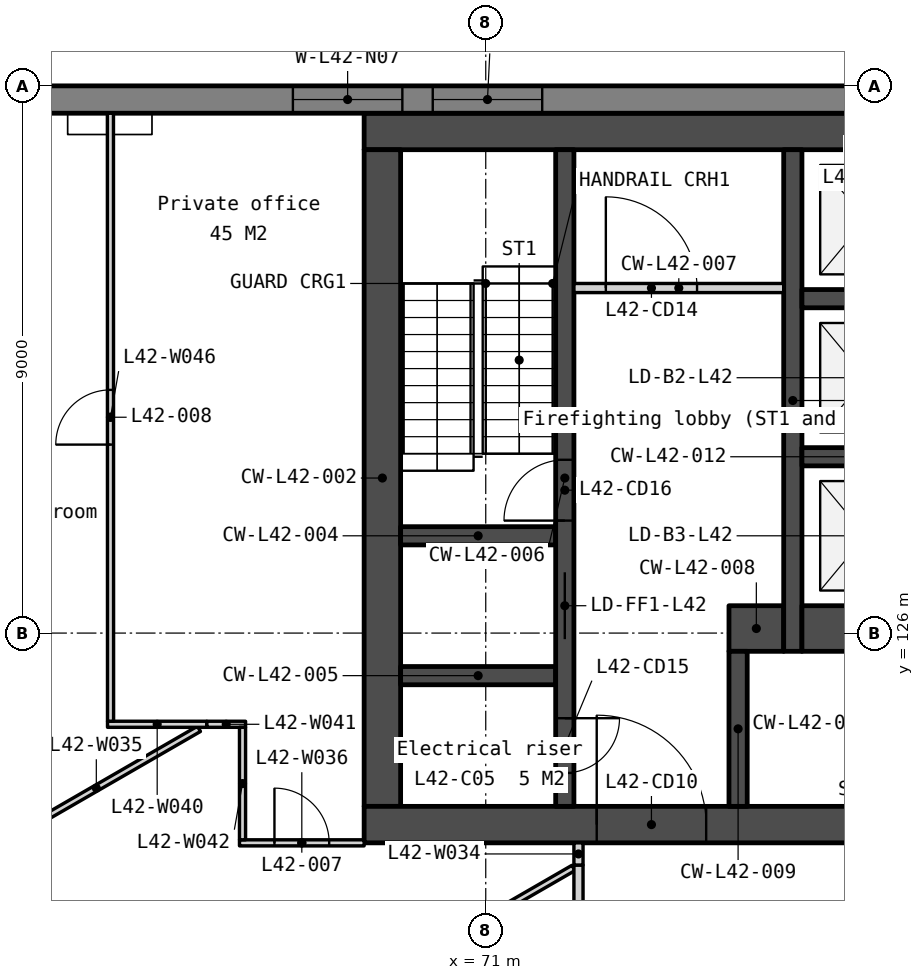
"""IFC4 building model, lengths in metres.
Left out: names, types, materials, properties, quantities, classifications, styles, units other than length and angle.
Written with IfcOpenShell. Run it as: python <this file> out.ifc"""

import sys

from ifc_helpers import new_model, si_unit, direction, frame, frame_2d, origin, place, context, subcontext, project, spatial, polyline, rectangle, outline, extrude, element, fill, save


model = new_model("IFC4")
c1 = context("Model", 3, precision=1e-05, world=origin(), true_north=direction((0.0, 1.0)))
c2 = subcontext(c1, "Body", "Model", "MODEL_VIEW")
j1 = project(units=[si_unit("LENGTHUNIT", "METRE"), si_unit("PLANEANGLEUNIT", "RADIAN")], contexts=[c1])
p1 = place(None, origin())
s1 = spatial("IfcSite", under=j1, at=p1, CompositionType="ELEMENT")
p2 = place(p1, origin())
s2 = spatial("IfcBuilding", under=s1, at=p2, CompositionType="ELEMENT")
p3 = place(p2, frame((0.0, 0.0, 167.6)))
s3 = spatial("IfcBuildingStorey", under=s2, at=p3, CompositionType="ELEMENT", Elevation=167.6)
p4 = place(p3, frame((69.0, 134.25, 0.0), z_axis=(0.0, 0.0, 1.0), x_axis=(1.0, 0.0, 0.0)))
e1 = element("IfcWall", 1, at=p4, inside=s3, PredefinedType="SOLIDWALL", context=c2, shape_type="SweptSolid", body=[
    extrude(rectangle(XDim=22.0, YDim=0.6, at=frame_2d((11.0, 0.0))), origin(), (0.0, 0.0, 1.0), 3.75),
])
p5 = place(p3, frame((69.3, 133.95, 0.0), z_axis=(0.0, 0.0, 1.0), x_axis=(0.0, -1.0, 0.0)))
e2 = element("IfcWall", 2, at=p5, inside=s3, PredefinedType="SOLIDWALL", context=c2, shape_type="SweptSolid", body=[
    extrude(rectangle(XDim=10.8, YDim=0.6, at=frame_2d((5.4, 0.0))), origin(), (0.0, 0.0, 1.0), 3.75),
])
p6 = place(p3, frame((69.0, 122.85, 0.0), z_axis=(0.0, 0.0, 1.0), x_axis=(1.0, 0.0, 0.0)))
e3 = element("IfcWall", 3, at=p6, inside=s3, PredefinedType="SOLIDWALL", context=c2, shape_type="SweptSolid", body=[
    extrude(rectangle(XDim=22.0, YDim=0.6, at=frame_2d((11.0, 0.0))), origin(), (0.0, 0.0, 1.0), 3.75),
])
p7 = place(p6, frame((16.375, 0.0, 0.0)))
e4 = element("IfcOpeningElement", 4, at=p7, cuts=e3, PredefinedType="OPENING", context=c2, shape_type="SweptSolid", body=[
    extrude(rectangle(XDim=1.8, YDim=2.1, at=frame_2d((0.9, 1.05))), frame((0.0, 0.31, 0.0), z_axis=(0.0, -1.0, 0.0), x_axis=(1.0, 0.0, 0.0)), (0.0, 0.0, 1.0), 0.62),
])
p8 = place(p6, frame((3.825, 0.0, 0.0)))
e5 = element("IfcOpeningElement", 5, at=p8, cuts=e3, PredefinedType="OPENING", context=c2, shape_type="SweptSolid", body=[
    extrude(rectangle(XDim=1.8, YDim=2.1, at=frame_2d((0.9, 1.05))), frame((0.0, 0.31, 0.0), z_axis=(0.0, -1.0, 0.0), x_axis=(1.0, 0.0, 0.0)), (0.0, 0.0, 1.0), 0.62),
])
p9 = place(p6, frame((12.85, 0.0, 0.0)))
e6 = element("IfcOpeningElement", 6, at=p9, cuts=e3, PredefinedType="OPENING", context=c2, shape_type="SweptSolid", body=[
    extrude(rectangle(XDim=1.5, YDim=2.1, at=frame_2d((0.75, 1.05))), frame((0.0, 0.31, 0.0), z_axis=(0.0, -1.0, 0.0), x_axis=(1.0, 0.0, 0.0)), (0.0, 0.0, 1.0), 0.62),
])
for number, where, z_axis, x_axis in (
    (7, (69.6, 127.6, 0.0), (0.0, 0.0, 1.0), (1.0, 0.0, 0.0)),
    (8, (69.6, 125.3, 0.0), (0.0, 0.0, 1.0), (1.0, 0.0, 0.0)),
):
    element("IfcWall", number, at=place(p3, frame(where, z_axis=z_axis, x_axis=x_axis)), inside=s3, PredefinedType="SOLIDWALL", context=c2, shape_type="SweptSolid", body=[
        extrude(rectangle(XDim=2.55, YDim=0.3, at=frame_2d((1.275, 0.0))), origin(), (0.0, 0.0, 1.0), 3.75),
    ])
p10 = place(p3, frame((72.3, 133.95, 0.0), z_axis=(0.0, 0.0, 1.0), x_axis=(0.0, -1.0, 0.0)))
e9 = element("IfcWall", 9, at=p10, inside=s3, PredefinedType="SOLIDWALL", context=c2, shape_type="SweptSolid", body=[
    extrude(rectangle(XDim=10.8, YDim=0.3, at=frame_2d((5.4, 0.0))), origin(), (0.0, 0.0, 1.0), 3.75),
])
p11 = place(p10, frame((6.95, 0.0, 0.0)))
e10 = element("IfcOpeningElement", 10, at=p11, cuts=e9, PredefinedType="OPENING", context=c2, shape_type="SweptSolid", body=[
    extrude(rectangle(XDim=1.1, YDim=2.1, at=frame_2d((0.55, 1.05))), frame((0.0, 0.16, 0.0), z_axis=(0.0, -1.0, 0.0), x_axis=(1.0, 0.0, 0.0)), (0.0, 0.0, 1.0), 0.32),
])
p12 = place(p10, frame((9.35, 0.0, 0.0)))
e11 = element("IfcOpeningElement", 11, at=p12, cuts=e9, PredefinedType="OPENING", context=c2, shape_type="SweptSolid", body=[
    extrude(rectangle(XDim=0.9, YDim=2.1, at=frame_2d((0.45, 1.05))), frame((0.0, 0.16, 0.0), z_axis=(0.0, -1.0, 0.0), x_axis=(1.0, 0.0, 0.0)), (0.0, 0.0, 1.0), 0.32),
])
p13 = place(p10, frame((5.1, 0.0, 0.0)))
e12 = element("IfcOpeningElement", 12, at=p13, cuts=e9, PredefinedType="OPENING", context=c2, shape_type="SweptSolid", body=[
    extrude(rectangle(XDim=1.0, YDim=2.1, at=frame_2d((0.5, 1.05))), frame((0.0, 0.16, 0.0), z_axis=(0.0, -1.0, 0.0), x_axis=(1.0, 0.0, 0.0)), (0.0, 0.0, 1.0), 0.32),
])
p14 = place(p3, frame((72.45, 131.675, 0.0), z_axis=(0.0, 0.0, 1.0), x_axis=(1.0, 0.0, 0.0)))
e13 = element("IfcWall", 13, at=p14, inside=s3, PredefinedType="PARTITIONING", context=c2, shape_type="SweptSolid", body=[
    extrude(rectangle(XDim=3.45, YDim=0.15, at=frame_2d((1.725, 0.0))), origin(), (0.0, 0.0, 1.0), 3.75),
])
p15 = place(p14, frame((0.525, 0.0, 0.0)))
e14 = element("IfcOpeningElement", 14, at=p15, cuts=e13, PredefinedType="OPENING", context=c2, shape_type="SweptSolid", body=[
    extrude(rectangle(XDim=1.5, YDim=2.1, at=frame_2d((0.75, 1.05))), frame((0.0, 0.085, 0.0), z_axis=(0.0, -1.0, 0.0), x_axis=(1.0, 0.0, 0.0)), (0.0, 0.0, 1.0), 0.17),
])
p16 = place(p3, frame((75.0, 126.075, 0.0), z_axis=(0.0, 0.0, 1.0), x_axis=(1.0, 0.0, 0.0)))
e15 = element("IfcWall", 15, at=p16, inside=s3, PredefinedType="SOLIDWALL", context=c2, shape_type="SweptSolid", body=[
    extrude(rectangle(XDim=0.9, YDim=0.75, at=frame_2d((0.45, 0.0))), origin(), (0.0, 0.0, 1.0), 3.75),
])
p17 = place(p3, frame((75.15, 125.7, 0.0), z_axis=(0.0, 0.0, 1.0), x_axis=(0.0, -1.0, 0.0)))
e16 = element("IfcWall", 16, at=p17, inside=s3, PredefinedType="SOLIDWALL", context=c2, shape_type="SweptSolid", body=[
    extrude(rectangle(XDim=2.55, YDim=0.3, at=frame_2d((1.275, 0.0))), origin(), (0.0, 0.0, 1.0), 3.75),
])
p18 = place(p3, frame((76.05, 133.95, 0.0), z_axis=(0.0, 0.0, 1.0), x_axis=(0.0, -1.0, 0.0)))
e17 = element("IfcWall", 17, at=p18, inside=s3, PredefinedType="SOLIDWALL", context=c2, shape_type="SweptSolid", body=[
    extrude(rectangle(XDim=8.25, YDim=0.3, at=frame_2d((4.125, 0.0))), origin(), (0.0, 0.0, 1.0), 3.75),
])
for number, where, z_axis, x_axis in (
    (18, (76.2, 131.5, 0.0), (0.0, 0.0, 1.0), (1.0, 0.0, 0.0)),
    (19, (76.2, 128.9, 0.0), (0.0, 0.0, 1.0), (1.0, 0.0, 0.0)),
):
    element("IfcWall", number, at=place(p3, frame(where, z_axis=z_axis, x_axis=x_axis)), inside=s3, PredefinedType="SOLIDWALL", context=c2, shape_type="SweptSolid", body=[
        extrude(rectangle(XDim=2.1, YDim=0.3, at=frame_2d((1.05, 0.0))), origin(), (0.0, 0.0, 1.0), 3.75),
    ])
p19 = place(p3, frame((76.2, 126.075, 0.0), z_axis=(0.0, 0.0, 1.0), x_axis=(1.0, 0.0, 0.0)))
e20 = element("IfcWall", 20, at=p19, inside=s3, PredefinedType="SOLIDWALL", context=c2, shape_type="SweptSolid", body=[
    extrude(rectangle(XDim=2.1, YDim=0.75, at=frame_2d((1.05, 0.0))), origin(), (0.0, 0.0, 1.0), 3.75),
])
p20 = place(p3, frame((100.243, 134.775, -0.15), z_axis=(0.0, 0.0, 1.0), x_axis=(-1.0, 0.0, 0.0)))
e21 = element("IfcWall", 21, at=p20, inside=s3, PredefinedType="SOLIDWALL", context=c2, shape_type="SweptSolid", body=[
    extrude(outline(polyline([(40.486, 0.0), (40.486, 3.9), (0.0, 3.9), (0.0, 0.0), (40.486, 0.0)])), frame((0.0, 0.225, 0.0), z_axis=(0.0, -1.0, 0.0), x_axis=(1.0, 0.0, 0.0)), (0.0, 0.0, 1.0), 0.45),
])
p21 = place(p20, frame((0.87, 0.0, 0.95)))
e22 = element("IfcOpeningElement", 22, at=p21, cuts=e21, PredefinedType="OPENING", context=c2, shape_type="SweptSolid", body=[
    extrude(rectangle(XDim=1.2, YDim=2.2, at=frame_2d((0.6, 1.1))), frame((0.0, 0.235, 0.0), z_axis=(0.0, -1.0, 0.0), x_axis=(1.0, 0.0, 0.0)), (0.0, 0.0, 1.0), 0.47),
])
p22 = place(p20, frame((8.072, 0.0, 0.95)))
e23 = element("IfcOpeningElement", 23, at=p22, cuts=e21, PredefinedType="OPENING", context=c2, shape_type="SweptSolid", body=[
    extrude(rectangle(XDim=1.8, YDim=2.2, at=frame_2d((0.9, 1.1))), frame((0.0, 0.235, 0.0), z_axis=(0.0, -1.0, 0.0), x_axis=(1.0, 0.0, 0.0)), (0.0, 0.0, 1.0), 0.47),
])
p23 = place(p20, frame((10.372, 0.0, 0.95)))
e24 = element("IfcOpeningElement", 24, at=p23, cuts=e21, PredefinedType="OPENING", context=c2, shape_type="SweptSolid", body=[
    extrude(rectangle(XDim=1.8, YDim=2.2, at=frame_2d((0.9, 1.1))), frame((0.0, 0.235, 0.0), z_axis=(0.0, -1.0, 0.0), x_axis=(1.0, 0.0, 0.0)), (0.0, 0.0, 1.0), 0.47),
])
p24 = place(p20, frame((18.193, 0.0, 0.95)))
e25 = element("IfcOpeningElement", 25, at=p24, cuts=e21, PredefinedType="OPENING", context=c2, shape_type="SweptSolid", body=[
    extrude(rectangle(XDim=1.8, YDim=2.2, at=frame_2d((0.9, 1.1))), frame((0.0, 0.235, 0.0), z_axis=(0.0, -1.0, 0.0), x_axis=(1.0, 0.0, 0.0)), (0.0, 0.0, 1.0), 0.47),
])
p25 = place(p20, frame((20.493, 0.0, 0.95)))
e26 = element("IfcOpeningElement", 26, at=p25, cuts=e21, PredefinedType="OPENING", context=c2, shape_type="SweptSolid", body=[
    extrude(rectangle(XDim=1.8, YDim=2.2, at=frame_2d((0.9, 1.1))), frame((0.0, 0.235, 0.0), z_axis=(0.0, -1.0, 0.0), x_axis=(1.0, 0.0, 0.0)), (0.0, 0.0, 1.0), 0.47),
])
p26 = place(p20, frame((28.315, 0.0, 0.95)))
e27 = element("IfcOpeningElement", 27, at=p26, cuts=e21, PredefinedType="OPENING", context=c2, shape_type="SweptSolid", body=[
    extrude(rectangle(XDim=1.8, YDim=2.2, at=frame_2d((0.9, 1.1))), frame((0.0, 0.235, 0.0), z_axis=(0.0, -1.0, 0.0), x_axis=(1.0, 0.0, 0.0)), (0.0, 0.0, 1.0), 0.47),
])
p27 = place(p20, frame((30.615, 0.0, 0.95)))
e28 = element("IfcOpeningElement", 28, at=p27, cuts=e21, PredefinedType="OPENING", context=c2, shape_type="SweptSolid", body=[
    extrude(rectangle(XDim=1.8, YDim=2.2, at=frame_2d((0.9, 1.1))), frame((0.0, 0.235, 0.0), z_axis=(0.0, -1.0, 0.0), x_axis=(1.0, 0.0, 0.0)), (0.0, 0.0, 1.0), 0.47),
])
p28 = place(p20, frame((38.417, 0.0, 0.95)))
e29 = element("IfcOpeningElement", 29, at=p28, cuts=e21, PredefinedType="OPENING", context=c2, shape_type="SweptSolid", body=[
    extrude(rectangle(XDim=1.2, YDim=2.2, at=frame_2d((0.6, 1.1))), frame((0.0, 0.235, 0.0), z_axis=(0.0, -1.0, 0.0), x_axis=(1.0, 0.0, 0.0)), (0.0, 0.0, 1.0), 0.47),
])
p29 = place(p3, frame((57.652, 131.129, -0.15), z_axis=(0.0, 0.0, 1.0), x_axis=(0.499997369791, -0.866026922331, 0.0)))
e30 = element("IfcWall", 30, at=p29, inside=s3, PredefinedType="SOLIDWALL", context=c2, shape_type="SweptSolid", body=[
    extrude(outline(polyline([(40.486, 0.0), (40.486, 3.9), (0.0, 3.9), (0.0, 0.0), (40.486, 0.0)])), frame((0.0, 0.225, 0.0), z_axis=(0.0, -1.0, 0.0), x_axis=(1.0, 0.0, 0.0)), (0.0, 0.0, 1.0), 0.45),
])
p30 = place(p29, frame((0.87, 0.0, 0.95)))
e31 = element("IfcOpeningElement", 31, at=p30, cuts=e30, PredefinedType="OPENING", context=c2, shape_type="SweptSolid", body=[
    extrude(rectangle(XDim=1.2, YDim=2.2, at=frame_2d((0.6, 1.1))), frame((0.0, 0.235, 0.0), z_axis=(0.0, -1.0, 0.0), x_axis=(1.0, 0.0, 0.0)), (0.0, 0.0, 1.0), 0.47),
])
p31 = place(p29, frame((8.072, 0.0, 0.95)))
e32 = element("IfcOpeningElement", 32, at=p31, cuts=e30, PredefinedType="OPENING", context=c2, shape_type="SweptSolid", body=[
    extrude(rectangle(XDim=1.8, YDim=2.2, at=frame_2d((0.9, 1.1))), frame((0.0, 0.235, 0.0), z_axis=(0.0, -1.0, 0.0), x_axis=(1.0, 0.0, 0.0)), (0.0, 0.0, 1.0), 0.47),
])
p32 = place(p29, frame((10.372, 0.0, 0.95)))
e33 = element("IfcOpeningElement", 33, at=p32, cuts=e30, PredefinedType="OPENING", context=c2, shape_type="SweptSolid", body=[
    extrude(rectangle(XDim=1.8, YDim=2.2, at=frame_2d((0.9, 1.1))), frame((0.0, 0.235, 0.0), z_axis=(0.0, -1.0, 0.0), x_axis=(1.0, 0.0, 0.0)), (0.0, 0.0, 1.0), 0.47),
])
p33 = place(p29, frame((18.193, 0.0, 0.95)))
e34 = element("IfcOpeningElement", 34, at=p33, cuts=e30, PredefinedType="OPENING", context=c2, shape_type="SweptSolid", body=[
    extrude(rectangle(XDim=1.8, YDim=2.2, at=frame_2d((0.9, 1.1))), frame((0.0, 0.235, 0.0), z_axis=(0.0, -1.0, 0.0), x_axis=(1.0, 0.0, 0.0)), (0.0, 0.0, 1.0), 0.47),
])
p34 = place(p29, frame((20.493, 0.0, 0.95)))
e35 = element("IfcOpeningElement", 35, at=p34, cuts=e30, PredefinedType="OPENING", context=c2, shape_type="SweptSolid", body=[
    extrude(rectangle(XDim=1.8, YDim=2.2, at=frame_2d((0.9, 1.1))), frame((0.0, 0.235, 0.0), z_axis=(0.0, -1.0, 0.0), x_axis=(1.0, 0.0, 0.0)), (0.0, 0.0, 1.0), 0.47),
])
p35 = place(p29, frame((28.315, 0.0, 0.95)))
e36 = element("IfcOpeningElement", 36, at=p35, cuts=e30, PredefinedType="OPENING", context=c2, shape_type="SweptSolid", body=[
    extrude(rectangle(XDim=1.8, YDim=2.2, at=frame_2d((0.9, 1.1))), frame((0.0, 0.235, 0.0), z_axis=(0.0, -1.0, 0.0), x_axis=(1.0, 0.0, 0.0)), (0.0, 0.0, 1.0), 0.47),
])
p36 = place(p29, frame((30.615, 0.0, 0.95)))
e37 = element("IfcOpeningElement", 37, at=p36, cuts=e30, PredefinedType="OPENING", context=c2, shape_type="SweptSolid", body=[
    extrude(rectangle(XDim=1.8, YDim=2.2, at=frame_2d((0.9, 1.1))), frame((0.0, 0.235, 0.0), z_axis=(0.0, -1.0, 0.0), x_axis=(1.0, 0.0, 0.0)), (0.0, 0.0, 1.0), 0.47),
])
p37 = place(p29, frame((38.417, 0.0, 0.95)))
e38 = element("IfcOpeningElement", 38, at=p37, cuts=e30, PredefinedType="OPENING", context=c2, shape_type="SweptSolid", body=[
    extrude(rectangle(XDim=1.2, YDim=2.2, at=frame_2d((0.6, 1.1))), frame((0.0, 0.235, 0.0), z_axis=(0.0, -1.0, 0.0), x_axis=(1.0, 0.0, 0.0)), (0.0, 0.0, 1.0), 0.47),
])
p38 = place(p3, frame((65.438, 118.093, 0.0), z_axis=(0.0, 0.0, 1.0), x_axis=(0.866029768103, 0.499992440702, 0.0)))
e39 = element("IfcWall", 39, at=p38, inside=s3, PredefinedType="PARTITIONING", context=c2, shape_type="SweptSolid", body=[
    extrude(rectangle(XDim=8.089, YDim=0.1, at=frame_2d((4.044, 0.0))), origin(), (0.0, 0.0, 1.0), 3.75),
])
p39 = place(p38, frame((3.594, 0.0, 0.0)))
e40 = element("IfcOpeningElement", 40, at=p39, cuts=e39, PredefinedType="OPENING", context=c2, shape_type="SweptSolid", body=[
    extrude(rectangle(XDim=0.9, YDim=2.1, at=frame_2d((0.45, 1.05))), frame((0.0, 0.06, 0.0), z_axis=(0.0, -1.0, 0.0), x_axis=(1.0, 0.0, 0.0)), (0.0, 0.0, 1.0), 0.12),
])
p40 = place(p3, frame((72.525, 119.875, 0.0), z_axis=(0.0, 0.0, 1.0), x_axis=(0.0, 1.0, 0.0)))
e41 = element("IfcWall", 41, at=p40, inside=s3, PredefinedType="PARTITIONING", context=c2, shape_type="SweptSolid", body=[
    extrude(rectangle(XDim=2.31, YDim=0.15, at=frame_2d((1.155, 0.0))), origin(), (0.0, 0.0, 1.0), 3.75),
])
p41 = place(p3, frame((72.525, 122.185, 0.0), z_axis=(0.0, 0.0, 1.0), x_axis=(0.0, 1.0, 0.0)))
e42 = element("IfcWall", 42, at=p41, inside=s3, PredefinedType="PARTITIONING", context=c2, shape_type="SweptSolid", body=[
    extrude(rectangle(XDim=0.365, YDim=0.15, at=frame_2d((0.183, 0.0))), origin(), (0.0, 0.0, 1.0), 3.75),
])
p42 = place(p3, frame((62.907, 122.476, 0.0), z_axis=(0.0, 0.0, 1.0), x_axis=(0.866014543207, 0.500018810599, 0.0)))
e43 = element("IfcWall", 43, at=p42, inside=s3, PredefinedType="PARTITIONING", context=c2, shape_type="SweptSolid", body=[
    extrude(rectangle(XDim=3.898, YDim=0.1, at=frame_2d((1.949, 0.0))), origin(), (0.0, 0.0, 1.0), 3.75),
])
p43 = place(p3, frame((66.95, 122.55, 0.0), z_axis=(0.0, 0.0, 1.0), x_axis=(1.0, 0.0, 0.0)))
e44 = element("IfcWall", 44, at=p43, inside=s3, PredefinedType="PARTITIONING", context=c2, shape_type="SweptSolid", body=[
    extrude(rectangle(XDim=2.05, YDim=0.1, at=frame_2d((1.025, 0.0))), origin(), (0.0, 0.0, 1.0), 3.75),
])
p44 = place(p43, frame((0.575, 0.0, 0.0)))
e45 = element("IfcOpeningElement", 45, at=p44, cuts=e44, PredefinedType="OPENING", context=c2, shape_type="SweptSolid", body=[
    extrude(rectangle(XDim=0.9, YDim=2.1, at=frame_2d((0.45, 1.05))), frame((0.0, 0.06, 0.0), z_axis=(0.0, -1.0, 0.0), x_axis=(1.0, 0.0, 0.0)), (0.0, 0.0, 1.0), 0.12),
])
p45 = place(p3, frame((64.78, 124.5, 0.0), z_axis=(0.0, 0.0, 1.0), x_axis=(1.0, 0.0, 0.0)))
e46 = element("IfcWall", 46, at=p45, inside=s3, PredefinedType="PARTITIONING", context=c2, shape_type="SweptSolid", body=[
    extrude(rectangle(XDim=1.634, YDim=0.1, at=frame_2d((0.817, 0.0))), origin(), (0.0, 0.0, 1.0), 3.75),
])
p46 = place(p3, frame((66.414, 124.5, 0.0), z_axis=(0.0, 0.0, 1.0), x_axis=(1.0, 0.0, 0.0)))
e47 = element("IfcWall", 47, at=p46, inside=s3, PredefinedType="PARTITIONING", context=c2, shape_type="SweptSolid", body=[
    extrude(rectangle(XDim=0.636, YDim=0.1, at=frame_2d((0.318, 0.0))), origin(), (0.0, 0.0, 1.0), 3.75),
])
p47 = place(p3, frame((67.0, 122.6, 0.0), z_axis=(0.0, 0.0, 1.0), x_axis=(0.0, 1.0, 0.0)))
e48 = element("IfcWall", 48, at=p47, inside=s3, PredefinedType="PARTITIONING", context=c2, shape_type="SweptSolid", body=[
    extrude(rectangle(XDim=1.85, YDim=0.1, at=frame_2d((0.925, 0.0))), origin(), (0.0, 0.0, 1.0), 3.75),
])
p48 = place(p3, frame((64.83, 124.55, 0.0), z_axis=(0.0, 0.0, 1.0), x_axis=(-0.000195312496, 0.999999980927, 0.0)))
e49 = element("IfcWall", 49, at=p48, inside=s3, PredefinedType="PARTITIONING", context=c2, shape_type="SweptSolid", body=[
    extrude(rectangle(XDim=10.0, YDim=0.1, at=frame_2d((5.0, 0.0))), origin(), (0.0, 0.0, 1.0), 3.75),
])
p49 = place(p48, frame((4.55, 0.0, 0.0)))
e50 = element("IfcOpeningElement", 50, at=p49, cuts=e49, PredefinedType="OPENING", context=c2, shape_type="SweptSolid", body=[
    extrude(rectangle(XDim=0.9, YDim=2.1, at=frame_2d((0.45, 1.05))), frame((0.0, 0.06, 0.0), z_axis=(0.0, -1.0, 0.0), x_axis=(1.0, 0.0, 0.0)), (0.0, 0.0, 1.0), 0.12),
])
p50 = place(p11, origin())
e51 = element("IfcDoor", 51, at=p50, inside=s3, OperationType="SLIDING_TO_LEFT", PredefinedType="DOOR", context=c2, shape_type="SweptSolid", body=[
    extrude(rectangle(XDim=1.1, YDim=2.1, at=frame_2d((0.55, 1.05))), frame((0.0, 0.025, 0.0), z_axis=(0.0, -1.0, 0.0), x_axis=(1.0, 0.0, 0.0)), (0.0, 0.0, 1.0), 0.05),
])
fill(e10, e51)
p51 = place(p8, origin())
e52 = element("IfcDoor", 52, at=p51, inside=s3, OperationType="DOUBLE_DOOR_DOUBLE_SWING", PredefinedType="DOOR", context=c2, shape_type="SweptSolid", body=[
    extrude(rectangle(XDim=1.8, YDim=2.1, at=frame_2d((0.9, 1.05))), frame((0.0, 0.025, 0.0), z_axis=(0.0, -1.0, 0.0), x_axis=(1.0, 0.0, 0.0)), (0.0, 0.0, 1.0), 0.05),
])
fill(e5, e52)
p52 = place(p15, origin())
e53 = element("IfcDoor", 53, at=p52, inside=s3, OperationType="DOUBLE_DOOR_DOUBLE_SWING", PredefinedType="DOOR", context=c2, shape_type="SweptSolid", body=[
    extrude(rectangle(XDim=1.5, YDim=2.1, at=frame_2d((0.75, 1.05))), frame((0.0, 0.025, 0.0), z_axis=(0.0, -1.0, 0.0), x_axis=(1.0, 0.0, 0.0)), (0.0, 0.0, 1.0), 0.05),
])
fill(e14, e53)
p53 = place(p12, origin())
e54 = element("IfcDoor", 54, at=p53, inside=s3, OperationType="SINGLE_SWING_LEFT", PredefinedType="DOOR", context=c2, shape_type="SweptSolid", body=[
    extrude(rectangle(XDim=0.9, YDim=2.1, at=frame_2d((0.45, 1.05))), frame((0.0, 0.025, 0.0), z_axis=(0.0, -1.0, 0.0), x_axis=(1.0, 0.0, 0.0)), (0.0, 0.0, 1.0), 0.05),
])
fill(e11, e54)
p54 = place(p13, origin())
e55 = element("IfcDoor", 55, at=p54, inside=s3, OperationType="SINGLE_SWING_RIGHT", PredefinedType="DOOR", context=c2, shape_type="SweptSolid", body=[
    extrude(rectangle(XDim=1.0, YDim=2.1, at=frame_2d((0.5, 1.05))), frame((0.0, 0.025, 0.0), z_axis=(0.0, -1.0, 0.0), x_axis=(1.0, 0.0, 0.0)), (0.0, 0.0, 1.0), 0.05),
])
fill(e12, e55)
p55 = place(p26, origin())
e56 = element("IfcWindow", 56, at=p55, inside=s3, PartitioningType="SINGLE_PANEL", PredefinedType="WINDOW", context=c2, shape_type="SweptSolid", body=[
    extrude(rectangle(XDim=1.8, YDim=2.2, at=frame_2d((0.9, 1.1))), frame((0.0, 0.03, 0.0), z_axis=(0.0, -1.0, 0.0), x_axis=(1.0, 0.0, 0.0)), (0.0, 0.0, 1.0), 0.06),
])
fill(e27, e56)
p56 = place(p27, origin())
e57 = element("IfcWindow", 57, at=p56, inside=s3, PartitioningType="SINGLE_PANEL", PredefinedType="WINDOW", context=c2, shape_type="SweptSolid", body=[
    extrude(rectangle(XDim=1.8, YDim=2.2, at=frame_2d((0.9, 1.1))), frame((0.0, 0.03, 0.0), z_axis=(0.0, -1.0, 0.0), x_axis=(1.0, 0.0, 0.0)), (0.0, 0.0, 1.0), 0.06),
])
fill(e28, e57)
p57 = place(p44, origin())
e58 = element("IfcDoor", 58, at=p57, inside=s3, OperationType="SINGLE_SWING_LEFT", PredefinedType="DOOR", context=c2, shape_type="SweptSolid", body=[
    extrude(rectangle(XDim=0.9, YDim=2.1, at=frame_2d((0.45, 1.05))), frame((0.0, 0.025, 0.0), z_axis=(0.0, -1.0, 0.0), x_axis=(1.0, 0.0, 0.0)), (0.0, 0.0, 1.0), 0.05),
])
fill(e45, e58)
p58 = place(p49, origin())
e59 = element("IfcDoor", 59, at=p58, inside=s3, OperationType="SINGLE_SWING_LEFT", PredefinedType="DOOR", context=c2, shape_type="SweptSolid", body=[
    extrude(rectangle(XDim=0.9, YDim=2.1, at=frame_2d((0.45, 1.05))), frame((0.0, 0.025, 0.0), z_axis=(0.0, -1.0, 0.0), x_axis=(1.0, 0.0, 0.0)), (0.0, 0.0, 1.0), 0.05),
])
fill(e50, e59)
save(model, sys.argv[1])
